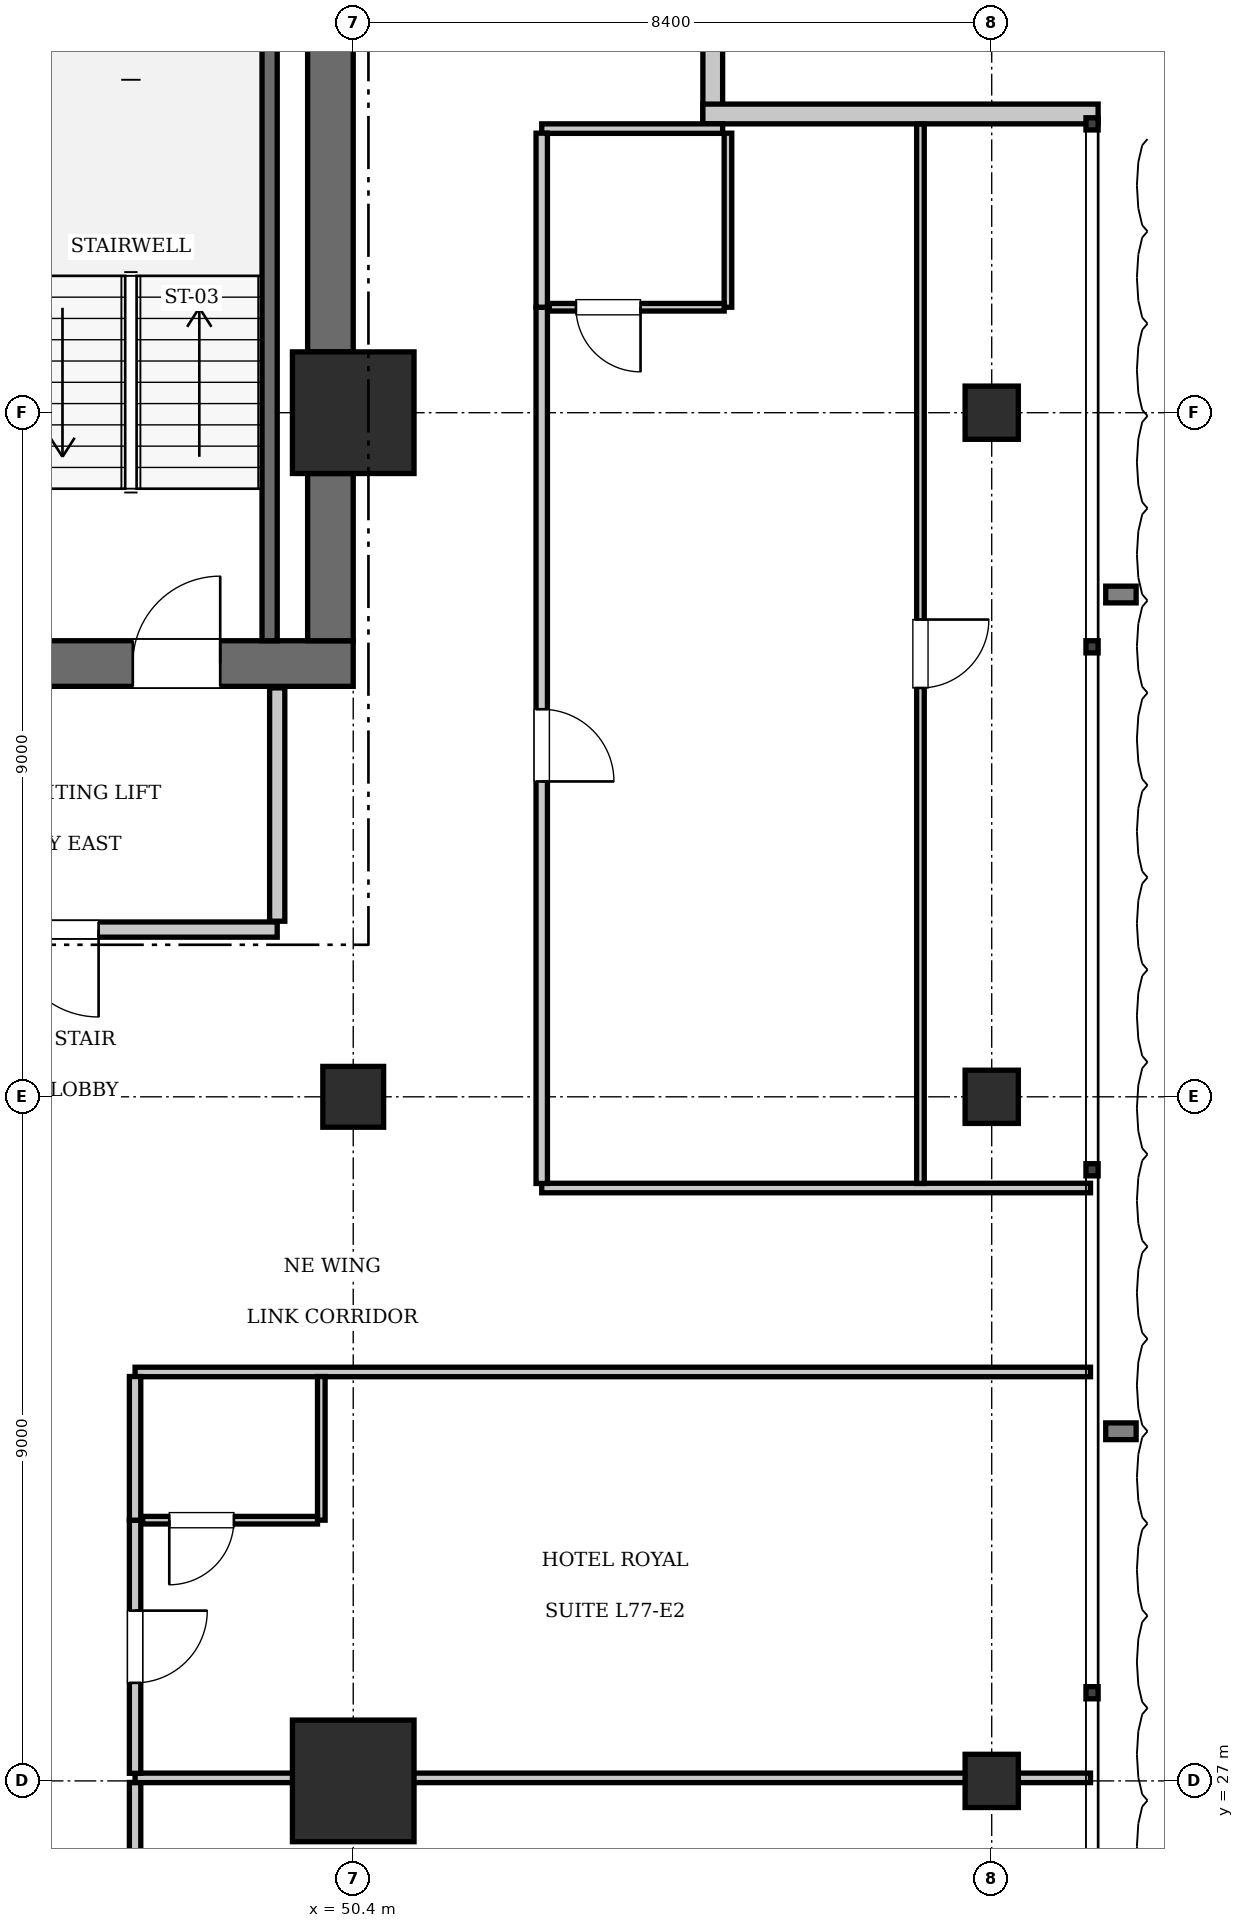
"""IFC4 building model, lengths in metres.
Left out: names, types, materials, properties, quantities, classifications, styles, units other than length and angle.
Written with IfcOpenShell. Run it as: python <this file> out.ifc"""

import sys

from ifc_helpers import new_model, si_unit, direction, frame, frame_2d, origin, origin_2d, place, context, subcontext, project, spatial, rectangle, extrude, element, fill, save


model = new_model("IFC4")
c1 = context("Model", 3, precision=1e-05, world=origin(), true_north=direction((0.0, 1.0)))
c2 = subcontext(c1, "Body", "Model", "MODEL_VIEW")
j1 = project(units=[si_unit("LENGTHUNIT", "METRE"), si_unit("PLANEANGLEUNIT", "RADIAN")], contexts=[c1])
p1 = place(None, origin())
s1 = spatial("IfcSite", under=j1, at=p1, CompositionType="ELEMENT")
p2 = place(p1, origin())
s2 = spatial("IfcBuilding", under=s1, at=p2, CompositionType="ELEMENT")
p3 = place(p2, frame((0.0, 0.0, 312.55)))
s3 = spatial("IfcBuildingStorey", under=s2, at=p3, CompositionType="ELEMENT", Elevation=312.55)
for number, where, z_axis, x_axis in (
    (1, (50.4, 27.0, 0.0), (0.0, 0.0, 1.0), (1.0, 0.0, 0.0)),
    (2, (50.4, 45.0, 0.0), (0.0, 0.0, 1.0), (1.0, 0.0, 0.0)),
):
    element("IfcColumn", number, at=place(p3, frame(where, z_axis=z_axis, x_axis=x_axis)), inside=s3, PredefinedType="COLUMN", context=c2, shape_type="SweptSolid", body=[
        extrude(rectangle(XDim=1.6, YDim=1.6, at=origin_2d()), origin(), (0.0, 0.0, 1.0), 3.85),
    ])
p4 = place(p3, frame((43.6, 41.7, 0.0), z_axis=(0.0, 0.0, 1.0), x_axis=(1.0, 0.0, 0.0)))
e3 = element("IfcWall", 3, at=p4, inside=s3, PredefinedType="SHEAR", context=c2, shape_type="SweptSolid", body=[
    extrude(rectangle(XDim=6.8, YDim=0.6, at=frame_2d((3.4, 0.0))), origin(), (0.0, 0.0, 1.0), 3.85),
])
p5 = place(p4, frame((3.9, 0.0, 0.0)))
e4 = element("IfcOpeningElement", 4, at=p5, cuts=e3, PredefinedType="OPENING", context=c2, shape_type="SweptSolid", body=[
    extrude(rectangle(XDim=1.15, YDim=2.15, at=frame_2d((0.575, 1.075))), frame((0.0, 0.31, 0.0), z_axis=(0.0, -1.0, 0.0), x_axis=(1.0, 0.0, 0.0)), (0.0, 0.0, 1.0), 0.62),
])
p6 = place(p4, frame((0.55, 0.0, 0.0)))
e5 = element("IfcOpeningElement", 5, at=p6, cuts=e3, PredefinedType="OPENING", context=c2, shape_type="SweptSolid", body=[
    extrude(rectangle(XDim=1.1, YDim=2.2, at=frame_2d((0.55, 1.1))), frame((0.0, 0.31, 0.0), z_axis=(0.0, -1.0, 0.0), x_axis=(1.0, 0.0, 0.0)), (0.0, 0.0, 1.0), 0.62),
])
p7 = place(p3, frame((50.1, 42.0, 0.0), z_axis=(0.0, 0.0, 1.0), x_axis=(0.0, 1.0, 0.0)))
e6 = element("IfcWall", 6, at=p7, inside=s3, PredefinedType="SHEAR", context=c2, shape_type="SweptSolid", body=[
    extrude(rectangle(XDim=2.2, YDim=0.6, at=frame_2d((1.1, 0.0))), origin(), (0.0, 0.0, 1.0), 3.85),
])
p8 = place(p3, frame((50.1, 45.8, 0.0), z_axis=(0.0, 0.0, 1.0), x_axis=(0.0, 1.0, 0.0)))
e7 = element("IfcWall", 7, at=p8, inside=s3, PredefinedType="SHEAR", context=c2, shape_type="SweptSolid", body=[
    extrude(rectangle(XDim=7.6, YDim=0.6, at=frame_2d((3.8, 0.0))), origin(), (0.0, 0.0, 1.0), 3.85),
])
p9 = place(p3, frame((50.4, 36.0, 0.0), z_axis=(0.0, 0.0, 1.0), x_axis=(1.0, 0.0, 0.0)))
e8 = element("IfcColumn", 8, at=p9, inside=s3, PredefinedType="COLUMN", context=c2, shape_type="SweptSolid", body=[
    extrude(rectangle(XDim=0.8, YDim=0.8, at=origin_2d()), origin(), (0.0, 0.0, 1.0), 3.85),
])
for number, where, z_axis, x_axis in (
    (9, (58.8, 27.0, 0.0), (0.0, 0.0, 1.0), (1.0, 0.0, 0.0)),
    (10, (58.8, 36.0, 0.0), (0.0, 0.0, 1.0), (1.0, 0.0, 0.0)),
    (11, (58.8, 45.0, 0.0), (0.0, 0.0, 1.0), (1.0, 0.0, 0.0)),
):
    element("IfcColumn", number, at=place(p3, frame(where, z_axis=z_axis, x_axis=x_axis)), inside=s3, PredefinedType="COLUMN", context=c2, shape_type="SweptSolid", body=[
        extrude(rectangle(XDim=0.7, YDim=0.7, at=origin_2d()), origin(), (0.0, 0.0, 1.0), 3.85),
    ])
p10 = place(p3, frame((49.3, 42.0, 0.0), z_axis=(0.0, 0.0, 1.0), x_axis=(0.0, 1.0, 0.0)))
e12 = element("IfcWall", 12, at=p10, inside=s3, PredefinedType="SOLIDWALL", context=c2, shape_type="SweptSolid", body=[
    extrude(rectangle(XDim=9.12, YDim=0.2, at=frame_2d((4.56, 0.0))), origin(), (0.0, 0.0, 1.0), 3.55),
])
for number, where, z_axis, x_axis in (
    (13, (55.13, 54.0, 0.0), (0.0, 0.0, 1.0), (0.0, -1.0, 0.0)),
    (14, (55.0, 48.93, 0.0), (0.0, 0.0, 1.0), (1.0, 0.0, 0.0)),
):
    element("IfcWall", number, at=place(p3, frame(where, z_axis=z_axis, x_axis=x_axis)), inside=s3, PredefinedType="SOLIDWALL", context=c2, shape_type="SweptSolid", body=[
        extrude(rectangle(XDim=5.2, YDim=0.26, at=frame_2d((2.6, 0.0))), origin(), (0.0, 0.0, 1.0), 3.55),
    ])
p11 = place(p3, frame((43.6, 38.2, 0.0), z_axis=(0.0, 0.0, 1.0), x_axis=(1.0, 0.0, 0.0)))
e15 = element("IfcWall", 15, at=p11, inside=s3, PredefinedType="PARTITIONING", context=c2, shape_type="SweptSolid", body=[
    extrude(rectangle(XDim=5.8, YDim=0.2, at=frame_2d((2.9, 0.0))), origin(), (0.0, 0.0, 1.0), 3.55),
])
p12 = place(p11, frame((2.3, 0.0, 0.0)))
e16 = element("IfcOpeningElement", 16, at=p12, cuts=e15, PredefinedType="OPENING", context=c2, shape_type="SweptSolid", body=[
    extrude(rectangle(XDim=1.15, YDim=2.15, at=frame_2d((0.575, 1.075))), frame((0.0, 0.11, 0.0), z_axis=(0.0, -1.0, 0.0), x_axis=(1.0, 0.0, 0.0)), (0.0, 0.0, 1.0), 0.22),
])
p13 = place(p3, frame((49.4, 38.31, 0.0), z_axis=(0.0, 0.0, 1.0), x_axis=(0.0, 1.0, 0.0)))
e17 = element("IfcWall", 17, at=p13, inside=s3, PredefinedType="PARTITIONING", context=c2, shape_type="SweptSolid", body=[
    extrude(rectangle(XDim=3.07, YDim=0.2, at=frame_2d((1.535, 0.0))), origin(), (0.0, 0.0, 1.0), 3.55),
])
p14 = place(p3, frame((47.53, 32.38, 0.0), z_axis=(0.0, 0.0, 1.0), x_axis=(1.0, 0.0, 0.0)))
e18 = element("IfcWall", 18, at=p14, inside=s3, PredefinedType="PARTITIONING", context=c2, shape_type="SweptSolid", body=[
    extrude(rectangle(XDim=12.57, YDim=0.125, at=frame_2d((6.285, 0.0))), origin(), (0.0, 0.0, 1.0), 3.55),
])
p15 = place(p3, frame((47.53, 23.65, 0.0), z_axis=(0.0, 0.0, 1.0), x_axis=(0.0, 1.0, 0.0)))
e19 = element("IfcWall", 19, at=p15, inside=s3, PredefinedType="PARTITIONING", context=c2, shape_type="SweptSolid", body=[
    extrude(rectangle(XDim=3.33, YDim=0.15, at=frame_2d((1.665, 0.0))), origin(), (0.0, 0.0, 1.0), 3.55),
])
p16 = place(p15, frame((1.19, 0.0, 0.0)))
e20 = element("IfcOpeningElement", 20, at=p16, cuts=e19, PredefinedType="OPENING", context=c2, shape_type="SweptSolid", body=[
    extrude(rectangle(XDim=0.95, YDim=2.15, at=frame_2d((0.475, 1.075))), frame((0.0, 0.085, 0.0), z_axis=(0.0, -1.0, 0.0), x_axis=(1.0, 0.0, 0.0)), (0.0, 0.0, 1.0), 0.17),
])
p17 = place(p3, frame((47.53, 27.04, 0.0), z_axis=(0.0, 0.0, 1.0), x_axis=(1.0, 0.0, 0.0)))
e21 = element("IfcWall", 21, at=p17, inside=s3, PredefinedType="PARTITIONING", context=c2, shape_type="SweptSolid", body=[
    extrude(rectangle(XDim=12.57, YDim=0.125, at=frame_2d((6.285, 0.0))), origin(), (0.0, 0.0, 1.0), 2.35),
])
p18 = place(p3, frame((47.53, 27.1, 0.0), z_axis=(0.0, 0.0, 1.0), x_axis=(0.0, 1.0, 0.0)))
e22 = element("IfcWall", 22, at=p18, inside=s3, PredefinedType="PARTITIONING", context=c2, shape_type="SweptSolid", body=[
    extrude(rectangle(XDim=3.33, YDim=0.15, at=frame_2d((1.665, 0.0))), origin(), (0.0, 0.0, 1.0), 3.55),
])
p19 = place(p18, frame((1.19, 0.0, 0.0)))
e23 = element("IfcOpeningElement", 23, at=p19, cuts=e22, PredefinedType="OPENING", context=c2, shape_type="SweptSolid", body=[
    extrude(rectangle(XDim=0.95, YDim=2.15, at=frame_2d((0.475, 1.075))), frame((0.0, 0.085, 0.0), z_axis=(0.0, -1.0, 0.0), x_axis=(1.0, 0.0, 0.0)), (0.0, 0.0, 1.0), 0.17),
])
p20 = place(p3, frame((47.53, 30.43, 0.0), z_axis=(0.0, 0.0, 1.0), x_axis=(0.0, 1.0, 0.0)))
e24 = element("IfcWall", 24, at=p20, inside=s3, PredefinedType="PARTITIONING", context=c2, shape_type="SweptSolid", body=[
    extrude(rectangle(XDim=1.89, YDim=0.15, at=frame_2d((0.945, 0.0))), origin(), (0.0, 0.0, 1.0), 3.55),
])
p21 = place(p3, frame((49.98, 30.43, 0.0), z_axis=(0.0, 0.0, 1.0), x_axis=(0.0, 1.0, 0.0)))
e25 = element("IfcWall", 25, at=p21, inside=s3, PredefinedType="PARTITIONING", context=c2, shape_type="SweptSolid", body=[
    extrude(rectangle(XDim=1.89, YDim=0.1, at=frame_2d((0.945, 0.0))), origin(), (0.0, 0.0, 1.0), 3.55),
])
p22 = place(p3, frame((47.63, 30.43, 0.0), z_axis=(0.0, 0.0, 1.0), x_axis=(1.0, 0.0, 0.0)))
e26 = element("IfcWall", 26, at=p22, inside=s3, PredefinedType="PARTITIONING", context=c2, shape_type="SweptSolid", body=[
    extrude(rectangle(XDim=2.3, YDim=0.1, at=frame_2d((1.15, 0.0))), origin(), (0.0, 0.0, 1.0), 3.55),
])
p23 = place(p22, frame((0.35, 0.0, 0.0)))
e27 = element("IfcOpeningElement", 27, at=p23, cuts=e26, PredefinedType="OPENING", context=c2, shape_type="SweptSolid", body=[
    extrude(rectangle(XDim=0.85, YDim=2.1, at=frame_2d((0.425, 1.05))), frame((0.0, 0.06, 0.0), z_axis=(0.0, -1.0, 0.0), x_axis=(1.0, 0.0, 0.0)), (0.0, 0.0, 1.0), 0.12),
])
p24 = place(p3, frame((52.88, 34.8, 0.0), z_axis=(0.0, 0.0, 1.0), x_axis=(1.0, 0.0, 0.0)))
e28 = element("IfcWall", 28, at=p24, inside=s3, PredefinedType="PARTITIONING", context=c2, shape_type="SweptSolid", body=[
    extrude(rectangle(XDim=7.22, YDim=0.125, at=frame_2d((3.61, 0.0))), origin(), (0.0, 0.0, 1.0), 3.55),
])
p25 = place(p3, frame((52.88, 48.738, 0.0), z_axis=(0.0, 0.0, 1.0), x_axis=(1.0, 0.0, 0.0)))
e29 = element("IfcWall", 29, at=p25, inside=s3, PredefinedType="PARTITIONING", context=c2, shape_type="SweptSolid", body=[
    extrude(rectangle(XDim=2.38, YDim=0.125, at=frame_2d((1.19, 0.0))), origin(), (0.0, 0.0, 1.0), 3.55),
])
p26 = place(p3, frame((52.88, 34.86, 0.0), z_axis=(0.0, 0.0, 1.0), x_axis=(0.0, 1.0, 0.0)))
e30 = element("IfcWall", 30, at=p26, inside=s3, PredefinedType="PARTITIONING", context=c2, shape_type="SweptSolid", body=[
    extrude(rectangle(XDim=11.527, YDim=0.15, at=frame_2d((5.764, 0.0))), origin(), (0.0, 0.0, 1.0), 3.55),
])
p27 = place(p26, frame((5.289, 0.0, 0.0)))
e31 = element("IfcOpeningElement", 31, at=p27, cuts=e30, PredefinedType="OPENING", context=c2, shape_type="SweptSolid", body=[
    extrude(rectangle(XDim=0.95, YDim=2.15, at=frame_2d((0.475, 1.075))), frame((0.0, 0.085, 0.0), z_axis=(0.0, -1.0, 0.0), x_axis=(1.0, 0.0, 0.0)), (0.0, 0.0, 1.0), 0.17),
])
p28 = place(p3, frame((52.88, 46.387, 0.0), z_axis=(0.0, 0.0, 1.0), x_axis=(0.0, 1.0, 0.0)))
e32 = element("IfcWall", 32, at=p28, inside=s3, PredefinedType="PARTITIONING", context=c2, shape_type="SweptSolid", body=[
    extrude(rectangle(XDim=2.29, YDim=0.15, at=frame_2d((1.145, 0.0))), origin(), (0.0, 0.0, 1.0), 3.55),
])
p29 = place(p3, frame((55.33, 46.387, 0.0), z_axis=(0.0, 0.0, 1.0), x_axis=(0.0, 1.0, 0.0)))
e33 = element("IfcWall", 33, at=p29, inside=s3, PredefinedType="PARTITIONING", context=c2, shape_type="SweptSolid", body=[
    extrude(rectangle(XDim=2.29, YDim=0.1, at=frame_2d((1.145, 0.0))), origin(), (0.0, 0.0, 1.0), 3.55),
])
p30 = place(p3, frame((52.98, 46.387, 0.0), z_axis=(0.0, 0.0, 1.0), x_axis=(1.0, 0.0, 0.0)))
e34 = element("IfcWall", 34, at=p30, inside=s3, PredefinedType="PARTITIONING", context=c2, shape_type="SweptSolid", body=[
    extrude(rectangle(XDim=2.3, YDim=0.1, at=frame_2d((1.15, 0.0))), origin(), (0.0, 0.0, 1.0), 3.55),
])
p31 = place(p30, frame((0.35, 0.0, 0.0)))
e35 = element("IfcOpeningElement", 35, at=p31, cuts=e34, PredefinedType="OPENING", context=c2, shape_type="SweptSolid", body=[
    extrude(rectangle(XDim=0.85, YDim=2.1, at=frame_2d((0.425, 1.05))), frame((0.0, 0.06, 0.0), z_axis=(0.0, -1.0, 0.0), x_axis=(1.0, 0.0, 0.0)), (0.0, 0.0, 1.0), 0.12),
])
p32 = place(p3, frame((57.862, 34.86, 0.0), z_axis=(0.0, 0.0, 1.0), x_axis=(0.0, 1.0, 0.0)))
e36 = element("IfcWall", 36, at=p32, inside=s3, PredefinedType="PARTITIONING", context=c2, shape_type="SweptSolid", body=[
    extrude(rectangle(XDim=13.938, YDim=0.1, at=frame_2d((6.969, 0.0))), origin(), (0.0, 0.0, 1.0), 3.55),
])
p33 = place(p32, frame((6.519, 0.0, 0.0)))
e37 = element("IfcOpeningElement", 37, at=p33, cuts=e36, PredefinedType="OPENING", context=c2, shape_type="SweptSolid", body=[
    extrude(rectangle(XDim=0.9, YDim=2.1, at=frame_2d((0.45, 1.05))), frame((0.0, 0.06, 0.0), z_axis=(0.0, -1.0, 0.0), x_axis=(1.0, 0.0, 0.0)), (0.0, 0.0, 1.0), 0.12),
])
p34 = place(p5, origin())
e38 = element("IfcDoor", 38, at=p34, inside=s3, OperationType="SINGLE_SWING_RIGHT", PredefinedType="DOOR", context=c2, shape_type="SweptSolid", body=[
    extrude(rectangle(XDim=1.15, YDim=2.15, at=frame_2d((0.575, 1.075))), frame((0.0, 0.025, 0.0), z_axis=(0.0, -1.0, 0.0), x_axis=(1.0, 0.0, 0.0)), (0.0, 0.0, 1.0), 0.05),
])
fill(e4, e38)
p35 = place(p12, frame((1.15, 0.0, 0.0), z_axis=(0.0, 0.0, 1.0), x_axis=(-1.0, 0.0, 0.0)))
e39 = element("IfcDoor", 39, at=p35, inside=s3, OperationType="SINGLE_SWING_LEFT", PredefinedType="DOOR", context=c2, shape_type="SweptSolid", body=[
    extrude(rectangle(XDim=1.15, YDim=2.15, at=frame_2d((0.575, 1.075))), frame((0.0, 0.025, 0.0), z_axis=(0.0, -1.0, 0.0), x_axis=(1.0, 0.0, 0.0)), (0.0, 0.0, 1.0), 0.05),
])
fill(e16, e39)
p36 = place(p23, frame((0.85, 0.0, 0.0), z_axis=(0.0, 0.0, 1.0), x_axis=(-1.0, 0.0, 0.0)))
e40 = element("IfcDoor", 40, at=p36, inside=s3, OperationType="SINGLE_SWING_RIGHT", PredefinedType="DOOR", context=c2, shape_type="SweptSolid", body=[
    extrude(rectangle(XDim=0.85, YDim=2.1, at=frame_2d((0.425, 1.05))), frame((0.0, 0.025, 0.0), z_axis=(0.0, -1.0, 0.0), x_axis=(1.0, 0.0, 0.0)), (0.0, 0.0, 1.0), 0.05),
])
fill(e27, e40)
p37 = place(p19, frame((0.95, 0.0, 0.0), z_axis=(0.0, 0.0, 1.0), x_axis=(-1.0, 0.0, 0.0)))
e41 = element("IfcDoor", 41, at=p37, inside=s3, OperationType="SINGLE_SWING_LEFT", PredefinedType="DOOR", context=c2, shape_type="SweptSolid", body=[
    extrude(rectangle(XDim=0.95, YDim=2.15, at=frame_2d((0.475, 1.075))), frame((0.0, 0.025, 0.0), z_axis=(0.0, -1.0, 0.0), x_axis=(1.0, 0.0, 0.0)), (0.0, 0.0, 1.0), 0.05),
])
fill(e23, e41)
p38 = place(p31, frame((0.85, 0.0, 0.0), z_axis=(0.0, 0.0, 1.0), x_axis=(-1.0, 0.0, 0.0)))
e42 = element("IfcDoor", 42, at=p38, inside=s3, OperationType="SINGLE_SWING_LEFT", PredefinedType="DOOR", context=c2, shape_type="SweptSolid", body=[
    extrude(rectangle(XDim=0.85, YDim=2.1, at=frame_2d((0.425, 1.05))), frame((0.0, 0.025, 0.0), z_axis=(0.0, -1.0, 0.0), x_axis=(1.0, 0.0, 0.0)), (0.0, 0.0, 1.0), 0.05),
])
fill(e35, e42)
p39 = place(p27, frame((0.95, 0.0, 0.0), z_axis=(0.0, 0.0, 1.0), x_axis=(-1.0, 0.0, 0.0)))
e43 = element("IfcDoor", 43, at=p39, inside=s3, OperationType="SINGLE_SWING_RIGHT", PredefinedType="DOOR", context=c2, shape_type="SweptSolid", body=[
    extrude(rectangle(XDim=0.95, YDim=2.15, at=frame_2d((0.475, 1.075))), frame((0.0, 0.025, 0.0), z_axis=(0.0, -1.0, 0.0), x_axis=(1.0, 0.0, 0.0)), (0.0, 0.0, 1.0), 0.05),
])
fill(e31, e43)
p40 = place(p33, frame((0.9, 0.0, 0.0), z_axis=(0.0, 0.0, 1.0), x_axis=(-1.0, 0.0, 0.0)))
e44 = element("IfcDoor", 44, at=p40, inside=s3, OperationType="SINGLE_SWING_LEFT", PredefinedType="DOOR", context=c2, shape_type="SweptSolid", body=[
    extrude(rectangle(XDim=0.9, YDim=2.1, at=frame_2d((0.45, 1.05))), frame((0.0, 0.025, 0.0), z_axis=(0.0, -1.0, 0.0), x_axis=(1.0, 0.0, 0.0)), (0.0, 0.0, 1.0), 0.05),
])
fill(e37, e44)
save(model, sys.argv[1])
